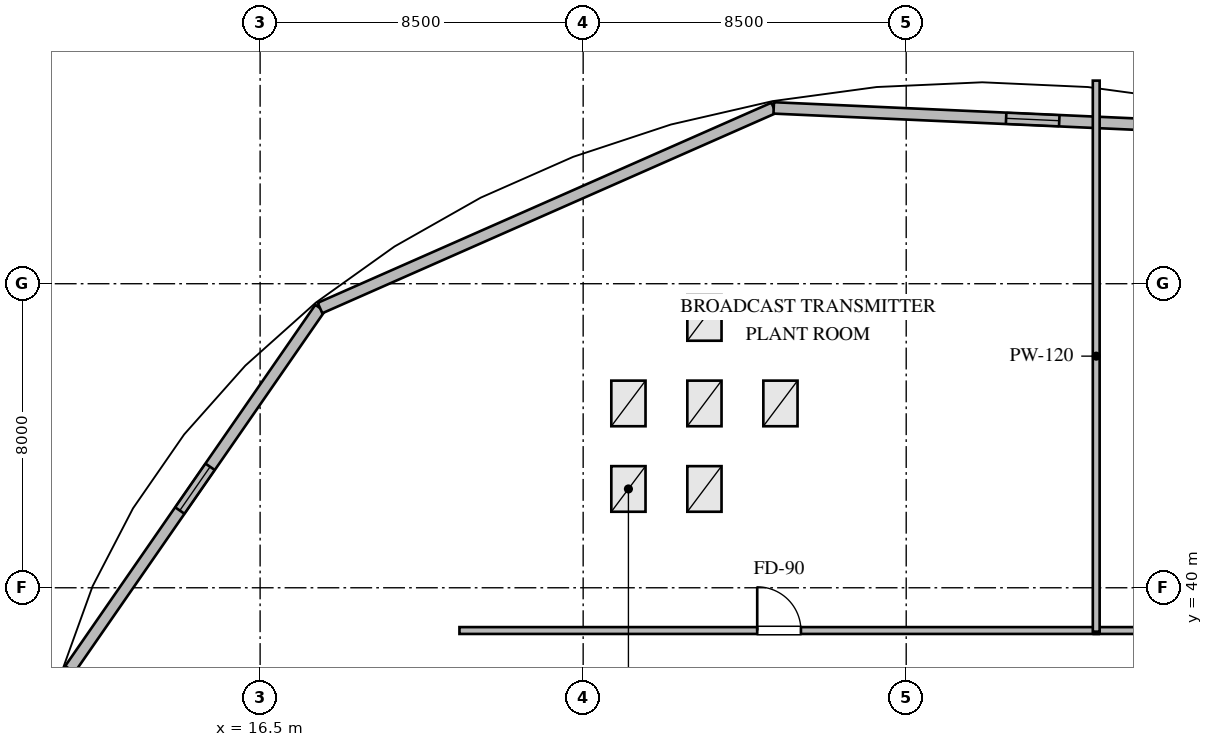
"""IFC4 building model, lengths in metres.
Left out: names, types, materials, properties, quantities, classifications, styles, units other than length and angle.
Written with IfcOpenShell. Run it as: python <this file> out.ifc"""

import sys

from ifc_helpers import new_model, si_unit, direction, frame, frame_2d, origin, place, context, subcontext, project, spatial, rectangle, extrude, element, fill, save


model = new_model("IFC4")
c1 = context("Model", 3, precision=1e-05, world=origin(), true_north=direction((0.0, 1.0)))
c2 = subcontext(c1, "Body", "Model", "MODEL_VIEW")
j1 = project(units=[si_unit("LENGTHUNIT", "METRE"), si_unit("PLANEANGLEUNIT", "RADIAN")], contexts=[c1])
p1 = place(None, origin())
s1 = spatial("IfcSite", under=j1, at=p1, CompositionType="ELEMENT")
p2 = place(p1, origin())
s2 = spatial("IfcBuilding", under=s1, at=p2, CompositionType="ELEMENT")
p3 = place(p2, frame((0.0, 0.0, 308.8)))
s3 = spatial("IfcBuildingStorey", under=s2, at=p3, CompositionType="ELEMENT", Elevation=308.8)
p4 = place(p3, frame((11.495, 37.856, 0.0), z_axis=(0.0, 0.0, 1.0), x_axis=(0.569269280193, 0.822151133691, 0.0)))
e1 = element("IfcWall", 1, at=p4, inside=s3, PredefinedType="STANDARD", context=c2, shape_type="SweptSolid", body=[
    extrude(rectangle(XDim=11.56, YDim=0.3, at=frame_2d((5.78, 0.0))), origin(), (0.0, 0.0, 1.0), 3.7),
])
p5 = place(p4, frame((5.08, 0.0, 1.2)))
e2 = element("IfcOpeningElement", 2, at=p5, cuts=e1, PredefinedType="OPENING", context=c2, shape_type="SweptSolid", body=[
    extrude(rectangle(XDim=1.4, YDim=1.2, at=frame_2d((0.7, 0.6))), frame((0.0, 0.16, 0.0), z_axis=(0.0, -1.0, 0.0), x_axis=(1.0, 0.0, 0.0)), (0.0, 0.0, 1.0), 0.32),
])
p6 = place(p3, frame((18.076, 47.36, 0.0), z_axis=(0.0, 0.0, 1.0), x_axis=(0.914943001047, 0.40358308294, 0.0)))
e3 = element("IfcWall", 3, at=p6, inside=s3, PredefinedType="STANDARD", context=c2, shape_type="SweptSolid", body=[
    extrude(rectangle(XDim=13.048, YDim=0.3, at=frame_2d((6.524, 0.0))), origin(), (0.0, 0.0, 1.0), 3.7),
])
p7 = place(p3, frame((30.014, 52.626, 0.0), z_axis=(0.0, 0.0, 1.0), x_axis=(0.998996211569, -0.04479474602, 0.0)))
e4 = element("IfcWall", 4, at=p7, inside=s3, PredefinedType="STANDARD", context=c2, shape_type="SweptSolid", body=[
    extrude(rectangle(XDim=13.642, YDim=0.3, at=frame_2d((6.821, 0.0))), origin(), (0.0, 0.0, 1.0), 3.7),
])
p8 = place(p7, frame((6.121, 0.0, 1.2)))
e5 = element("IfcOpeningElement", 5, at=p8, cuts=e4, PredefinedType="OPENING", context=c2, shape_type="SweptSolid", body=[
    extrude(rectangle(XDim=1.4, YDim=1.2, at=frame_2d((0.7, 0.6))), frame((0.0, 0.16, 0.0), z_axis=(0.0, -1.0, 0.0), x_axis=(1.0, 0.0, 0.0)), (0.0, 0.0, 1.0), 0.32),
])
p9 = place(p3, frame((21.745, 38.875, 0.0), z_axis=(0.0, 0.0, 1.0), x_axis=(1.0, 0.0, 0.0)))
e6 = element("IfcWall", 6, at=p9, inside=s3, PredefinedType="PARTITIONING", context=c2, shape_type="SweptSolid", body=[
    extrude(rectangle(XDim=16.82, YDim=0.18, at=frame_2d((8.41, 0.0))), origin(), (0.0, 0.0, 1.0), 3.7),
])
p10 = place(p9, frame((7.835, 0.0, 0.0)))
e7 = element("IfcOpeningElement", 7, at=p10, cuts=e6, PredefinedType="OPENING", context=c2, shape_type="SweptSolid", body=[
    extrude(rectangle(XDim=1.15, YDim=2.1, at=frame_2d((0.575, 1.05))), frame((0.0, 0.1, 0.0), z_axis=(0.0, -1.0, 0.0), x_axis=(1.0, 0.0, 0.0)), (0.0, 0.0, 1.0), 0.2),
])
p11 = place(p3, frame((38.435, 38.875, 0.0), z_axis=(0.0, 0.0, 1.0), x_axis=(1.0, 0.0, 0.0)))
e8 = element("IfcWall", 8, at=p11, inside=s3, PredefinedType="PARTITIONING", context=c2, shape_type="SweptSolid", body=[
    extrude(rectangle(XDim=8.02, YDim=0.18, at=frame_2d((4.01, 0.0))), origin(), (0.0, 0.0, 1.0), 3.7),
])
p12 = place(p11, frame((3.435, 0.0, 0.0)))
e9 = element("IfcOpeningElement", 9, at=p12, cuts=e8, PredefinedType="OPENING", context=c2, shape_type="SweptSolid", body=[
    extrude(rectangle(XDim=1.15, YDim=2.1, at=frame_2d((0.575, 1.05))), frame((0.0, 0.1, 0.0), z_axis=(0.0, -1.0, 0.0), x_axis=(1.0, 0.0, 0.0)), (0.0, 0.0, 1.0), 0.2),
])
p13 = place(p3, frame((38.5, 53.344, 0.0), z_axis=(0.0, 0.0, 1.0), x_axis=(0.0, -1.0, 0.0)))
e10 = element("IfcWall", 10, at=p13, inside=s3, PredefinedType="PARTITIONING", context=c2, shape_type="SweptSolid", body=[
    extrude(rectangle(XDim=14.499, YDim=0.18, at=frame_2d((7.25, 0.0))), origin(), (0.0, 0.0, 1.0), 3.7),
])
p14 = place(p5, origin())
e11 = element("IfcWindow", 11, at=p14, inside=s3, PartitioningType="SINGLE_PANEL", PredefinedType="WINDOW", context=c2, shape_type="SweptSolid", body=[
    extrude(rectangle(XDim=1.4, YDim=1.2, at=frame_2d((0.7, 0.6))), frame((0.0, 0.03, 0.0), z_axis=(0.0, -1.0, 0.0), x_axis=(1.0, 0.0, 0.0)), (0.0, 0.0, 1.0), 0.06),
])
fill(e2, e11)
p15 = place(p8, origin())
e12 = element("IfcWindow", 12, at=p15, inside=s3, PartitioningType="SINGLE_PANEL", PredefinedType="WINDOW", context=c2, shape_type="SweptSolid", body=[
    extrude(rectangle(XDim=1.4, YDim=1.2, at=frame_2d((0.7, 0.6))), frame((0.0, 0.03, 0.0), z_axis=(0.0, -1.0, 0.0), x_axis=(1.0, 0.0, 0.0)), (0.0, 0.0, 1.0), 0.06),
])
fill(e5, e12)
p16 = place(p10, origin())
e13 = element("IfcDoor", 13, at=p16, inside=s3, OperationType="SINGLE_SWING_LEFT", PredefinedType="DOOR", context=c2, shape_type="SweptSolid", body=[
    extrude(rectangle(XDim=1.15, YDim=2.1, at=frame_2d((0.575, 1.05))), frame((0.0, 0.025, 0.0), z_axis=(0.0, -1.0, 0.0), x_axis=(1.0, 0.0, 0.0)), (0.0, 0.0, 1.0), 0.05),
])
fill(e7, e13)
save(model, sys.argv[1])
